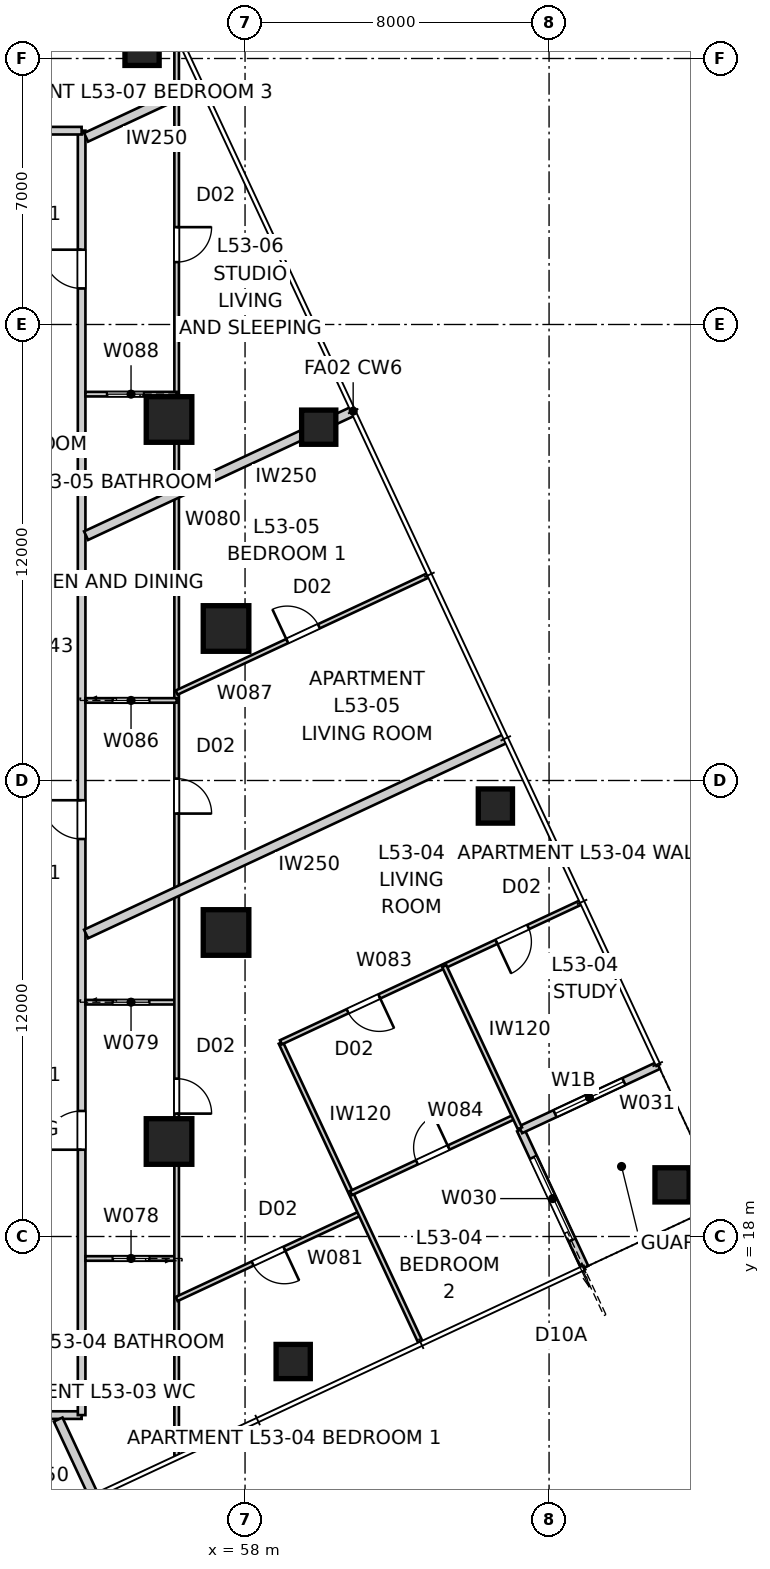
"""IFC4 building model, lengths in metres.
Left out: names, types, materials, properties, quantities, classifications, styles, units other than length and angle.
Written with IfcOpenShell. Run it as: python <this file> out.ifc"""

import sys

from ifc_helpers import new_model, si_unit, direction, frame, frame_2d, origin, origin_2d, place, context, subcontext, project, spatial, rectangle, extrude, element, fill, save


model = new_model("IFC4")
c1 = context("Model", 3, precision=1e-05, world=origin(), true_north=direction((0.0, 1.0)))
c2 = subcontext(c1, "Body", "Model", "MODEL_VIEW")
j1 = project(units=[si_unit("LENGTHUNIT", "METRE"), si_unit("PLANEANGLEUNIT", "RADIAN")], contexts=[c1])
p1 = place(None, origin())
s1 = spatial("IfcSite", under=j1, at=p1, CompositionType="ELEMENT")
p2 = place(p1, origin())
s2 = spatial("IfcBuilding", under=s1, at=p2, CompositionType="ELEMENT")
p3 = place(p2, frame((0.0, 0.0, 193.0)))
s3 = spatial("IfcBuildingStorey", under=s2, at=p3, CompositionType="ELEMENT", Elevation=193.0)
for number, where, z_axis, x_axis in (
    (1, (59.267, 14.71, 0.0), (0.0, 0.0, 1.0), (1.0, 0.0, 0.0)),
    (2, (69.236, 19.359, 0.0), (0.0, 0.0, 1.0), (1.0, 0.0, 0.0)),
    (3, (64.588, 29.328, 0.0), (0.0, 0.0, 1.0), (1.0, 0.0, 0.0)),
    (4, (59.939, 39.298, 0.0), (0.0, 0.0, 1.0), (1.0, 0.0, 0.0)),
    (5, (55.29, 49.267, 0.0), (0.0, 0.0, 1.0), (1.0, 0.0, 0.0)),
):
    element("IfcColumn", number, at=place(p3, frame(where, z_axis=z_axis, x_axis=x_axis)), inside=s3, PredefinedType="COLUMN", context=c2, shape_type="SweptSolid", body=[
        extrude(rectangle(XDim=0.9, YDim=0.9, at=origin_2d()), origin(), (0.0, 0.0, 1.0), 3.4),
    ])
for number, where, z_axis, x_axis in (
    (6, (57.5, 26.0, 0.0), (0.0, 0.0, 1.0), (1.0, 0.0, 0.0)),
    (7, (57.5, 34.0, 0.0), (0.0, 0.0, 1.0), (1.0, 0.0, 0.0)),
    (8, (56.0, 39.5, 0.0), (0.0, 0.0, 1.0), (1.0, 0.0, 0.0)),
    (9, (56.0, 20.5, 0.0), (0.0, 0.0, 1.0), (1.0, 0.0, 0.0)),
):
    element("IfcColumn", number, at=place(p3, frame(where, z_axis=z_axis, x_axis=x_axis)), inside=s3, PredefinedType="COLUMN", context=c2, shape_type="SweptSolid", body=[
        extrude(rectangle(XDim=1.2, YDim=1.2, at=origin_2d()), origin(), (0.0, 0.0, 1.0), 3.4),
    ])
p4 = place(p3, frame((66.94, 17.185, 0.0), z_axis=(0.0, 0.0, 1.0), x_axis=(-0.422658246362, 0.906289140828, 0.0)))
e10 = element("IfcWall", 10, at=p4, inside=s3, PredefinedType="SOLIDWALL", context=c2, shape_type="SweptSolid", body=[
    extrude(rectangle(XDim=4.0, YDim=0.2, at=frame_2d((2.0, 0.0))), origin(), (0.0, 0.0, 1.0), 3.25),
])
p5 = place(p4, frame((0.8, 0.0, 0.0)))
e11 = element("IfcOpeningElement", 11, at=p5, cuts=e10, PredefinedType="OPENING", context=c2, shape_type="SweptSolid", body=[
    extrude(rectangle(XDim=2.4, YDim=2.1, at=frame_2d((1.2, 1.05))), frame((0.0, 0.11, 0.0), z_axis=(0.0, -1.0, 0.0), x_axis=(1.0, 0.0, 0.0)), (0.0, 0.0, 1.0), 0.22),
])
p6 = place(p3, frame((65.25, 20.81, 0.0), z_axis=(0.0, 0.0, 1.0), x_axis=(0.906289140828, 0.422658246362, 0.0)))
e12 = element("IfcWall", 12, at=p6, inside=s3, PredefinedType="SOLIDWALL", context=c2, shape_type="SweptSolid", body=[
    extrude(rectangle(XDim=4.0, YDim=0.2, at=frame_2d((2.0, 0.0))), origin(), (0.0, 0.0, 1.0), 3.25),
])
p7 = place(p6, frame((1.0, 0.0, 0.45)))
e13 = element("IfcOpeningElement", 13, at=p7, cuts=e12, PredefinedType="OPENING", context=c2, shape_type="SweptSolid", body=[
    extrude(rectangle(XDim=2.0, YDim=1.8, at=frame_2d((1.0, 0.9))), frame((0.0, 0.11, 0.0), z_axis=(0.0, -1.0, 0.0), x_axis=(1.0, 0.0, 0.0)), (0.0, 0.0, 1.0), 0.22),
])
p8 = place(p3, frame((47.775, 13.3, 0.0), z_axis=(0.0, 0.0, 1.0), x_axis=(1.0, 0.0, 0.0)))
e14 = element("IfcWall", 14, at=p8, inside=s3, PredefinedType="PARTITIONING", context=c2, shape_type="SweptSolid", body=[
    extrude(rectangle(XDim=5.925, YDim=0.2, at=frame_2d((2.962, 0.0))), origin(), (0.0, 0.0, 1.0), 3.25),
])
p9 = place(p3, frame((53.7, 13.3, 0.0), z_axis=(0.0, 0.0, 1.0), x_axis=(0.0, 1.0, 0.0)))
e15 = element("IfcWall", 15, at=p9, inside=s3, PredefinedType="PARTITIONING", context=c2, shape_type="SweptSolid", body=[
    extrude(rectangle(XDim=33.8, YDim=0.2, at=frame_2d((16.9, 0.0))), origin(), (0.0, 0.0, 1.0), 3.25),
])
p10 = place(p9, frame((6.984, 0.0, 0.0)))
e16 = element("IfcOpeningElement", 16, at=p10, cuts=e15, PredefinedType="OPENING", context=c2, shape_type="SweptSolid", body=[
    extrude(rectangle(XDim=1.02, YDim=2.34, at=frame_2d((0.51, 1.17))), frame((0.0, 0.11, 0.0), z_axis=(0.0, -1.0, 0.0), x_axis=(1.0, 0.0, 0.0)), (0.0, 0.0, 1.0), 0.22),
])
p11 = place(p9, frame((29.648, 0.0, 0.0)))
e17 = element("IfcOpeningElement", 17, at=p11, cuts=e15, PredefinedType="OPENING", context=c2, shape_type="SweptSolid", body=[
    extrude(rectangle(XDim=1.02, YDim=2.34, at=frame_2d((0.51, 1.17))), frame((0.0, 0.11, 0.0), z_axis=(0.0, -1.0, 0.0), x_axis=(1.0, 0.0, 0.0)), (0.0, 0.0, 1.0), 0.22),
])
p12 = place(p9, frame((15.16, 0.0, 0.0)))
e18 = element("IfcOpeningElement", 18, at=p12, cuts=e15, PredefinedType="OPENING", context=c2, shape_type="SweptSolid", body=[
    extrude(rectangle(XDim=1.02, YDim=2.34, at=frame_2d((0.51, 1.17))), frame((0.0, 0.11, 0.0), z_axis=(0.0, -1.0, 0.0), x_axis=(1.0, 0.0, 0.0)), (0.0, 0.0, 1.0), 0.22),
])
p13 = place(p3, frame((53.7, 47.1, 0.0), z_axis=(0.0, 0.0, 1.0), x_axis=(-1.0, 0.0, 0.0)))
e19 = element("IfcWall", 19, at=p13, inside=s3, PredefinedType="PARTITIONING", context=c2, shape_type="SweptSolid", body=[
    extrude(rectangle(XDim=7.392, YDim=0.2, at=frame_2d((3.696, 0.0))), origin(), (0.0, 0.0, 1.0), 3.25),
])
p14 = place(p13, frame((2.431, 0.0, 0.0)))
e20 = element("IfcOpeningElement", 20, at=p14, cuts=e19, PredefinedType="OPENING", context=c2, shape_type="SweptSolid", body=[
    extrude(rectangle(XDim=1.02, YDim=2.34, at=frame_2d((0.51, 1.17))), frame((0.0, 0.11, 0.0), z_axis=(0.0, -1.0, 0.0), x_axis=(1.0, 0.0, 0.0)), (0.0, 0.0, 1.0), 0.22),
])
p15 = place(p3, frame((54.025, 11.162, 0.0), z_axis=(0.0, 0.0, 1.0), x_axis=(-0.422609736898, 0.906311762187, 0.0)))
e21 = element("IfcWall", 21, at=p15, inside=s3, PredefinedType="PARTITIONING", context=c2, shape_type="SweptSolid", body=[
    extrude(rectangle(XDim=2.23, YDim=0.25, at=frame_2d((1.115, 0.0))), origin(), (0.0, 0.0, 1.0), 3.25),
])
p16 = place(p3, frame((60.845, 39.72, 0.0), z_axis=(0.0, 0.0, 1.0), x_axis=(-0.906308569177, -0.422616584432, 0.0)))
e22 = element("IfcWall", 22, at=p16, inside=s3, PredefinedType="PARTITIONING", context=c2, shape_type="SweptSolid", body=[
    extrude(rectangle(XDim=7.755, YDim=0.25, at=frame_2d((3.877, 0.0))), origin(), (0.0, 0.0, 1.0), 3.25),
])
p17 = place(p3, frame((64.86, 31.11, 0.0), z_axis=(0.0, 0.0, 1.0), x_axis=(-0.906303906082, -0.422626584374, 0.0)))
e23 = element("IfcWall", 23, at=p17, inside=s3, PredefinedType="PARTITIONING", context=c2, shape_type="SweptSolid", body=[
    extrude(rectangle(XDim=12.185, YDim=0.25, at=frame_2d((6.092, 0.0))), origin(), (0.0, 0.0, 1.0), 3.25),
])
p18 = place(p3, frame((56.83, 48.33, 0.0), z_axis=(0.0, 0.0, 1.0), x_axis=(-0.906310647924, -0.422612126495, 0.0)))
e24 = element("IfcWall", 24, at=p18, inside=s3, PredefinedType="PARTITIONING", context=c2, shape_type="SweptSolid", body=[
    extrude(rectangle(XDim=3.325, YDim=0.25, at=frame_2d((1.663, 0.0))), origin(), (0.0, 0.0, 1.0), 3.25),
])
p19 = place(p3, frame((56.2, 17.422, 0.0), z_axis=(0.0, 0.0, 1.0), x_axis=(-1.0, 0.0, 0.0)))
e25 = element("IfcWall", 25, at=p19, inside=s3, PredefinedType="PARTITIONING", context=c2, shape_type="SweptSolid", body=[
    extrude(rectangle(XDim=2.4, YDim=0.12, at=frame_2d((1.2, 0.0))), origin(), (0.0, 0.0, 1.0), 3.25),
])
p20 = place(p19, frame((0.72, 0.0, 0.0)))
e26 = element("IfcOpeningElement", 26, at=p20, cuts=e25, PredefinedType="OPENING", context=c2, shape_type="SweptSolid", body=[
    extrude(rectangle(XDim=0.96, YDim=2.1, at=frame_2d((0.48, 1.05))), frame((0.0, 0.07, 0.0), z_axis=(0.0, -1.0, 0.0), x_axis=(1.0, 0.0, 0.0)), (0.0, 0.0, 1.0), 0.14),
])
p21 = place(p3, frame((53.8, 24.166, 0.0), z_axis=(0.0, 0.0, 1.0), x_axis=(1.0, 0.0, 0.0)))
e27 = element("IfcWall", 27, at=p21, inside=s3, PredefinedType="PARTITIONING", context=c2, shape_type="SweptSolid", body=[
    extrude(rectangle(XDim=2.4, YDim=0.12, at=frame_2d((1.2, 0.0))), origin(), (0.0, 0.0, 1.0), 2.796),
])
p22 = place(p21, frame((0.72, 0.0, 0.0)))
e28 = element("IfcOpeningElement", 28, at=p22, cuts=e27, PredefinedType="OPENING", context=c2, shape_type="SweptSolid", body=[
    extrude(rectangle(XDim=0.96, YDim=2.1, at=frame_2d((0.48, 1.05))), frame((0.0, 0.07, 0.0), z_axis=(0.0, -1.0, 0.0), x_axis=(1.0, 0.0, 0.0)), (0.0, 0.0, 1.0), 0.14),
])
p23 = place(p3, frame((56.2, 49.642, 0.0), z_axis=(0.0, 0.0, 1.0), x_axis=(0.0, -1.0, 0.0)))
e29 = element("IfcWall", 29, at=p23, inside=s3, PredefinedType="PARTITIONING", context=c2, shape_type="SweptSolid", body=[
    extrude(rectangle(XDim=37.421, YDim=0.12, at=frame_2d((18.71, 0.0))), origin(), (0.0, 0.0, 1.0), 2.55),
])
p24 = place(p23, frame((27.488, 0.0, 0.0)))
e30 = element("IfcOpeningElement", 30, at=p24, cuts=e29, PredefinedType="OPENING", context=c2, shape_type="SweptSolid", body=[
    extrude(rectangle(XDim=0.92, YDim=2.34, at=frame_2d((0.46, 1.17))), frame((0.0, 0.07, 0.0), z_axis=(0.0, -1.0, 0.0), x_axis=(1.0, 0.0, 0.0)), (0.0, 0.0, 1.0), 0.14),
])
p25 = place(p23, frame((5.08, 0.0, 0.0)))
e31 = element("IfcOpeningElement", 31, at=p25, cuts=e29, PredefinedType="OPENING", context=c2, shape_type="SweptSolid", body=[
    extrude(rectangle(XDim=0.92, YDim=2.34, at=frame_2d((0.46, 1.17))), frame((0.0, 0.07, 0.0), z_axis=(0.0, -1.0, 0.0), x_axis=(1.0, 0.0, 0.0)), (0.0, 0.0, 1.0), 0.14),
])
p26 = place(p23, frame((19.592, 0.0, 0.0)))
e32 = element("IfcOpeningElement", 32, at=p26, cuts=e29, PredefinedType="OPENING", context=c2, shape_type="SweptSolid", body=[
    extrude(rectangle(XDim=0.92, YDim=2.34, at=frame_2d((0.46, 1.17))), frame((0.0, 0.07, 0.0), z_axis=(0.0, -1.0, 0.0), x_axis=(1.0, 0.0, 0.0)), (0.0, 0.0, 1.0), 0.14),
])
p27 = place(p3, frame((61.035, 18.609, 0.0), z_axis=(0.0, 0.0, 1.0), x_axis=(-0.906312880264, -0.422607339108, 0.0)))
e33 = element("IfcWall", 33, at=p27, inside=s3, PredefinedType="PARTITIONING", context=c2, shape_type="SweptSolid", body=[
    extrude(rectangle(XDim=5.334, YDim=0.12, at=frame_2d((2.667, 0.0))), origin(), (0.0, 0.0, 1.0), 3.25),
])
p28 = place(p27, frame((2.207, 0.0, 0.0)))
e34 = element("IfcOpeningElement", 34, at=p28, cuts=e33, PredefinedType="OPENING", context=c2, shape_type="SweptSolid", body=[
    extrude(rectangle(XDim=0.92, YDim=2.34, at=frame_2d((0.46, 1.17))), frame((0.0, 0.07, 0.0), z_axis=(0.0, -1.0, 0.0), x_axis=(1.0, 0.0, 0.0)), (0.0, 0.0, 1.0), 0.14),
])
p29 = place(p3, frame((58.941, 23.098, 0.0), z_axis=(0.0, 0.0, 1.0), x_axis=(0.422610460864, -0.906311424604, 0.0)))
e35 = element("IfcWall", 35, at=p29, inside=s3, PredefinedType="PARTITIONING", context=c2, shape_type="SweptSolid", body=[
    extrude(rectangle(XDim=8.7, YDim=0.12, at=frame_2d((4.35, 0.0))), origin(), (0.0, 0.0, 1.0), 3.25),
])
p30 = place(p3, frame((66.831, 26.789, 0.0), z_axis=(0.0, 0.0, 1.0), x_axis=(-0.906281301188, -0.422675056181, 0.0)))
e36 = element("IfcWall", 36, at=p30, inside=s3, PredefinedType="PARTITIONING", context=c2, shape_type="SweptSolid", body=[
    extrude(rectangle(XDim=8.703, YDim=0.12, at=frame_2d((4.352, 0.0))), origin(), (0.0, 0.0, 1.0), 3.25),
])
p31 = place(p30, frame((5.846, 0.0, 0.0)))
e37 = element("IfcOpeningElement", 37, at=p31, cuts=e36, PredefinedType="OPENING", context=c2, shape_type="SweptSolid", body=[
    extrude(rectangle(XDim=0.92, YDim=2.34, at=frame_2d((0.46, 1.17))), frame((0.0, 0.07, 0.0), z_axis=(0.0, -1.0, 0.0), x_axis=(1.0, 0.0, 0.0)), (0.0, 0.0, 1.0), 0.14),
])
p32 = place(p30, frame((1.525, 0.0, 0.0)))
e38 = element("IfcOpeningElement", 38, at=p32, cuts=e36, PredefinedType="OPENING", context=c2, shape_type="SweptSolid", body=[
    extrude(rectangle(XDim=0.92, YDim=2.34, at=frame_2d((0.46, 1.17))), frame((0.0, 0.07, 0.0), z_axis=(0.0, -1.0, 0.0), x_axis=(1.0, 0.0, 0.0)), (0.0, 0.0, 1.0), 0.14),
])
p33 = place(p3, frame((60.786, 19.142, 0.0), z_axis=(0.0, 0.0, 1.0), x_axis=(0.906296032609, 0.422643468278, 0.0)))
e39 = element("IfcWall", 39, at=p33, inside=s3, PredefinedType="PARTITIONING", context=c2, shape_type="SweptSolid", body=[
    extrude(rectangle(XDim=4.75, YDim=0.12, at=frame_2d((2.375, 0.0))), origin(), (0.0, 0.0, 1.0), 3.25),
])
p34 = place(p33, frame((1.915, 0.0, 0.0)))
e40 = element("IfcOpeningElement", 40, at=p34, cuts=e39, PredefinedType="OPENING", context=c2, shape_type="SweptSolid", body=[
    extrude(rectangle(XDim=0.92, YDim=2.34, at=frame_2d((0.46, 1.17))), frame((0.0, 0.07, 0.0), z_axis=(0.0, -1.0, 0.0), x_axis=(1.0, 0.0, 0.0)), (0.0, 0.0, 1.0), 0.14),
])
p35 = place(p3, frame((63.242, 25.115, 0.0), z_axis=(0.0, 0.0, 1.0), x_axis=(0.422601682441, -0.906315517906, 0.0)))
e41 = element("IfcWall", 41, at=p35, inside=s3, PredefinedType="PARTITIONING", context=c2, shape_type="SweptSolid", body=[
    extrude(rectangle(XDim=4.71, YDim=0.12, at=frame_2d((2.355, 0.0))), origin(), (0.0, 0.0, 1.0), 3.25),
])
p36 = place(p3, frame((53.8, 32.107, 0.0), z_axis=(0.0, 0.0, 1.0), x_axis=(1.0, 0.0, 0.0)))
e42 = element("IfcWall", 42, at=p36, inside=s3, PredefinedType="PARTITIONING", context=c2, shape_type="SweptSolid", body=[
    extrude(rectangle(XDim=2.4, YDim=0.12, at=frame_2d((1.2, 0.0))), origin(), (0.0, 0.0, 1.0), 3.25),
])
p37 = place(p36, frame((0.72, 0.0, 0.0)))
e43 = element("IfcOpeningElement", 43, at=p37, cuts=e42, PredefinedType="OPENING", context=c2, shape_type="SweptSolid", body=[
    extrude(rectangle(XDim=0.96, YDim=2.1, at=frame_2d((0.48, 1.05))), frame((0.0, 0.07, 0.0), z_axis=(0.0, -1.0, 0.0), x_axis=(1.0, 0.0, 0.0)), (0.0, 0.0, 1.0), 0.14),
])
p38 = place(p3, frame((56.2, 32.313, 0.0), z_axis=(0.0, 0.0, 1.0), x_axis=(0.906306986906, 0.422619977621, 0.0)))
e44 = element("IfcWall", 44, at=p38, inside=s3, PredefinedType="PARTITIONING", context=c2, shape_type="SweptSolid", body=[
    extrude(rectangle(XDim=7.3, YDim=0.12, at=frame_2d((3.65, 0.0))), origin(), (0.0, 0.0, 1.0), 3.25),
])
p39 = place(p38, frame((3.21, 0.0, 0.0)))
e45 = element("IfcOpeningElement", 45, at=p39, cuts=e44, PredefinedType="OPENING", context=c2, shape_type="SweptSolid", body=[
    extrude(rectangle(XDim=0.92, YDim=2.34, at=frame_2d((0.46, 1.17))), frame((0.0, 0.07, 0.0), z_axis=(0.0, -1.0, 0.0), x_axis=(1.0, 0.0, 0.0)), (0.0, 0.0, 1.0), 0.14),
])
p40 = place(p3, frame((56.2, 40.167, 0.0), z_axis=(0.0, 0.0, 1.0), x_axis=(-1.0, 0.0, 0.0)))
e46 = element("IfcWall", 46, at=p40, inside=s3, PredefinedType="PARTITIONING", context=c2, shape_type="SweptSolid", body=[
    extrude(rectangle(XDim=2.4, YDim=0.12, at=frame_2d((1.2, 0.0))), origin(), (0.0, 0.0, 1.0), 3.25),
])
p41 = place(p40, frame((0.87, 0.0, 0.0)))
e47 = element("IfcOpeningElement", 47, at=p41, cuts=e46, PredefinedType="OPENING", context=c2, shape_type="SweptSolid", body=[
    extrude(rectangle(XDim=0.96, YDim=2.1, at=frame_2d((0.48, 1.05))), frame((0.0, 0.07, 0.0), z_axis=(0.0, -1.0, 0.0), x_axis=(1.0, 0.0, 0.0)), (0.0, 0.0, 1.0), 0.14),
])
p42 = place(p5, origin())
e48 = element("IfcDoor", 48, at=p42, inside=s3, OperationType="SLIDING_TO_LEFT", PredefinedType="DOOR", context=c2, shape_type="SweptSolid", body=[
    extrude(rectangle(XDim=2.4, YDim=2.1, at=frame_2d((1.2, 1.05))), frame((0.0, 0.025, 0.0), z_axis=(0.0, -1.0, 0.0), x_axis=(1.0, 0.0, 0.0)), (0.0, 0.0, 1.0), 0.05),
])
fill(e11, e48)
p43 = place(p7, origin())
e49 = element("IfcWindow", 49, at=p43, inside=s3, PartitioningType="SINGLE_PANEL", PredefinedType="WINDOW", context=c2, shape_type="SweptSolid", body=[
    extrude(rectangle(XDim=2.0, YDim=1.8, at=frame_2d((1.0, 0.9))), frame((0.0, 0.03, 0.0), z_axis=(0.0, -1.0, 0.0), x_axis=(1.0, 0.0, 0.0)), (0.0, 0.0, 1.0), 0.06),
])
fill(e13, e49)
p44 = place(p10, origin())
e50 = element("IfcDoor", 50, at=p44, inside=s3, OperationType="SINGLE_SWING_LEFT", PredefinedType="DOOR", context=c2, shape_type="SweptSolid", body=[
    extrude(rectangle(XDim=1.02, YDim=2.34, at=frame_2d((0.51, 1.17))), frame((0.0, 0.025, 0.0), z_axis=(0.0, -1.0, 0.0), x_axis=(1.0, 0.0, 0.0)), (0.0, 0.0, 1.0), 0.05),
])
fill(e16, e50)
p45 = place(p11, origin())
e51 = element("IfcDoor", 51, at=p45, inside=s3, OperationType="SINGLE_SWING_RIGHT", PredefinedType="DOOR", context=c2, shape_type="SweptSolid", body=[
    extrude(rectangle(XDim=1.02, YDim=2.34, at=frame_2d((0.51, 1.17))), frame((0.0, 0.025, 0.0), z_axis=(0.0, -1.0, 0.0), x_axis=(1.0, 0.0, 0.0)), (0.0, 0.0, 1.0), 0.05),
])
fill(e17, e51)
p46 = place(p12, origin())
e52 = element("IfcDoor", 52, at=p46, inside=s3, OperationType="SINGLE_SWING_RIGHT", PredefinedType="DOOR", context=c2, shape_type="SweptSolid", body=[
    extrude(rectangle(XDim=1.02, YDim=2.34, at=frame_2d((0.51, 1.17))), frame((0.0, 0.025, 0.0), z_axis=(0.0, -1.0, 0.0), x_axis=(1.0, 0.0, 0.0)), (0.0, 0.0, 1.0), 0.05),
])
fill(e18, e52)
p47 = place(p24, origin())
e53 = element("IfcDoor", 53, at=p47, inside=s3, OperationType="SINGLE_SWING_RIGHT", PredefinedType="DOOR", context=c2, shape_type="SweptSolid", body=[
    extrude(rectangle(XDim=0.92, YDim=2.34, at=frame_2d((0.46, 1.17))), frame((0.0, 0.025, 0.0), z_axis=(0.0, -1.0, 0.0), x_axis=(1.0, 0.0, 0.0)), (0.0, 0.0, 1.0), 0.05),
])
fill(e30, e53)
p48 = place(p20, origin())
e54 = element("IfcDoor", 54, at=p48, inside=s3, OperationType="SLIDING_TO_LEFT", PredefinedType="DOOR", context=c2, shape_type="SweptSolid", body=[
    extrude(rectangle(XDim=0.96, YDim=2.1, at=frame_2d((0.48, 1.05))), frame((0.0, 0.025, 0.0), z_axis=(0.0, -1.0, 0.0), x_axis=(1.0, 0.0, 0.0)), (0.0, 0.0, 1.0), 0.05),
])
fill(e26, e54)
p49 = place(p22, origin())
e55 = element("IfcDoor", 55, at=p49, inside=s3, OperationType="SLIDING_TO_LEFT", PredefinedType="DOOR", context=c2, shape_type="SweptSolid", body=[
    extrude(rectangle(XDim=0.96, YDim=2.1, at=frame_2d((0.48, 1.05))), frame((0.0, 0.025, 0.0), z_axis=(0.0, -1.0, 0.0), x_axis=(1.0, 0.0, 0.0)), (0.0, 0.0, 1.0), 0.05),
])
fill(e28, e55)
p50 = place(p25, origin())
e56 = element("IfcDoor", 56, at=p50, inside=s3, OperationType="SINGLE_SWING_LEFT", PredefinedType="DOOR", context=c2, shape_type="SweptSolid", body=[
    extrude(rectangle(XDim=0.92, YDim=2.34, at=frame_2d((0.46, 1.17))), frame((0.0, 0.025, 0.0), z_axis=(0.0, -1.0, 0.0), x_axis=(1.0, 0.0, 0.0)), (0.0, 0.0, 1.0), 0.05),
])
fill(e31, e56)
p51 = place(p41, origin())
e57 = element("IfcDoor", 57, at=p51, inside=s3, OperationType="SLIDING_TO_LEFT", PredefinedType="DOOR", context=c2, shape_type="SweptSolid", body=[
    extrude(rectangle(XDim=0.96, YDim=2.1, at=frame_2d((0.48, 1.05))), frame((0.0, 0.025, 0.0), z_axis=(0.0, -1.0, 0.0), x_axis=(1.0, 0.0, 0.0)), (0.0, 0.0, 1.0), 0.05),
])
fill(e47, e57)
p52 = place(p26, origin())
e58 = element("IfcDoor", 58, at=p52, inside=s3, OperationType="SINGLE_SWING_RIGHT", PredefinedType="DOOR", context=c2, shape_type="SweptSolid", body=[
    extrude(rectangle(XDim=0.92, YDim=2.34, at=frame_2d((0.46, 1.17))), frame((0.0, 0.025, 0.0), z_axis=(0.0, -1.0, 0.0), x_axis=(1.0, 0.0, 0.0)), (0.0, 0.0, 1.0), 0.05),
])
fill(e32, e58)
p53 = place(p37, origin())
e59 = element("IfcDoor", 59, at=p53, inside=s3, OperationType="SLIDING_TO_LEFT", PredefinedType="DOOR", context=c2, shape_type="SweptSolid", body=[
    extrude(rectangle(XDim=0.96, YDim=2.1, at=frame_2d((0.48, 1.05))), frame((0.0, 0.025, 0.0), z_axis=(0.0, -1.0, 0.0), x_axis=(1.0, 0.0, 0.0)), (0.0, 0.0, 1.0), 0.05),
])
fill(e43, e59)
p54 = place(p28, origin())
e60 = element("IfcDoor", 60, at=p54, inside=s3, OperationType="SINGLE_SWING_LEFT", PredefinedType="DOOR", context=c2, shape_type="SweptSolid", body=[
    extrude(rectangle(XDim=0.92, YDim=2.34, at=frame_2d((0.46, 1.17))), frame((0.0, 0.025, 0.0), z_axis=(0.0, -1.0, 0.0), x_axis=(1.0, 0.0, 0.0)), (0.0, 0.0, 1.0), 0.05),
])
fill(e34, e60)
p55 = place(p31, origin())
e61 = element("IfcDoor", 61, at=p55, inside=s3, OperationType="SINGLE_SWING_LEFT", PredefinedType="DOOR", context=c2, shape_type="SweptSolid", body=[
    extrude(rectangle(XDim=0.92, YDim=2.34, at=frame_2d((0.46, 1.17))), frame((0.0, 0.025, 0.0), z_axis=(0.0, -1.0, 0.0), x_axis=(1.0, 0.0, 0.0)), (0.0, 0.0, 1.0), 0.05),
])
fill(e37, e61)
p56 = place(p32, origin())
e62 = element("IfcDoor", 62, at=p56, inside=s3, OperationType="SINGLE_SWING_RIGHT", PredefinedType="DOOR", context=c2, shape_type="SweptSolid", body=[
    extrude(rectangle(XDim=0.92, YDim=2.34, at=frame_2d((0.46, 1.17))), frame((0.0, 0.025, 0.0), z_axis=(0.0, -1.0, 0.0), x_axis=(1.0, 0.0, 0.0)), (0.0, 0.0, 1.0), 0.05),
])
fill(e38, e62)
p57 = place(p39, origin())
e63 = element("IfcDoor", 63, at=p57, inside=s3, OperationType="SINGLE_SWING_LEFT", PredefinedType="DOOR", context=c2, shape_type="SweptSolid", body=[
    extrude(rectangle(XDim=0.92, YDim=2.34, at=frame_2d((0.46, 1.17))), frame((0.0, 0.025, 0.0), z_axis=(0.0, -1.0, 0.0), x_axis=(1.0, 0.0, 0.0)), (0.0, 0.0, 1.0), 0.05),
])
fill(e45, e63)
p58 = place(p34, origin())
e64 = element("IfcDoor", 64, at=p58, inside=s3, OperationType="SINGLE_SWING_RIGHT", PredefinedType="DOOR", context=c2, shape_type="SweptSolid", body=[
    extrude(rectangle(XDim=0.92, YDim=2.34, at=frame_2d((0.46, 1.17))), frame((0.0, 0.025, 0.0), z_axis=(0.0, -1.0, 0.0), x_axis=(1.0, 0.0, 0.0)), (0.0, 0.0, 1.0), 0.05),
])
fill(e40, e64)
save(model, sys.argv[1])
